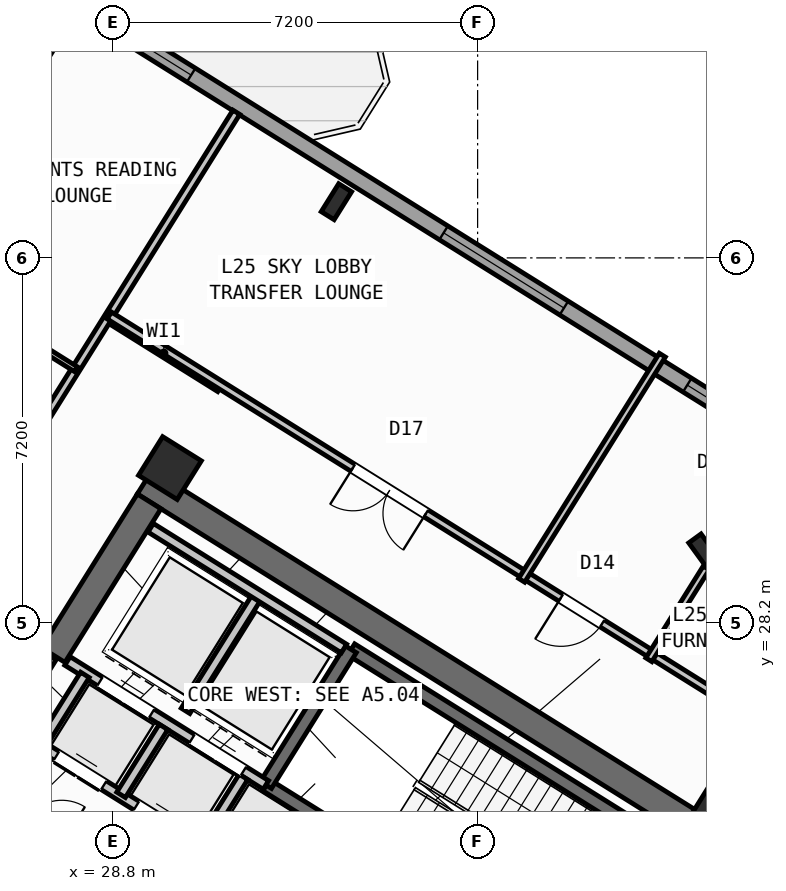
"""IFC4 building model, lengths in metres.
Left out: names, types, materials, properties, quantities, classifications, styles, units other than length and angle.
Written with IfcOpenShell. Run it as: python <this file> out.ifc"""

import sys

from ifc_helpers import new_model, si_unit, direction, frame, frame_2d, origin, origin_2d, place, context, subcontext, project, spatial, rectangle, hollow_rectangle, i_section, extrude, source, transform, mapped, element, fill, save


model = new_model("IFC4")
c1 = context("Model", 3, precision=1e-05, world=origin(), true_north=direction((0.0, 1.0)))
c2 = subcontext(c1, "Body", "Model", "MODEL_VIEW")
j1 = project(units=[si_unit("LENGTHUNIT", "METRE"), si_unit("PLANEANGLEUNIT", "RADIAN")], contexts=[c1])
p1 = place(None, origin())
s1 = spatial("IfcSite", under=j1, at=p1, CompositionType="ELEMENT")
p2 = place(p1, origin())
s2 = spatial("IfcBuilding", under=s1, at=p2, CompositionType="ELEMENT")
p3 = place(p2, frame((0.0, 0.0, 100.8)))
s3 = spatial("IfcBuildingStorey", under=s2, at=p3, CompositionType="ELEMENT", Elevation=100.8)
p4 = place(p3, frame((40.573, 24.01, 0.0), z_axis=(0.0, 0.0, 1.0), x_axis=(-0.848047359947, 0.529920442413, 0.0)))
e1 = element("IfcWall", 1, at=p4, inside=s3, PredefinedType="SHEAR", context=c2, shape_type="SweptSolid", body=[
    extrude(rectangle(XDim=13.14, YDim=0.55, at=frame_2d((6.57, 0.0))), origin(), (0.0, 0.0, 1.0), 4.25),
])
p5 = place(p3, frame((29.517, 30.594, 0.0), z_axis=(0.0, 0.0, 1.0), x_axis=(-0.529906864564, -0.848055844204, 0.0)))
e2 = element("IfcWall", 2, at=p5, inside=s3, PredefinedType="SHEAR", context=c2, shape_type="SweptSolid", body=[
    extrude(rectangle(XDim=3.575, YDim=0.55, at=frame_2d((1.788, 0.0))), origin(), (0.0, 0.0, 1.0), 4.25),
])
m1 = source(origin(), c2, "Body", "SweptSolid", [
    extrude(hollow_rectangle(XDim=0.9, YDim=0.9, WallThickness=0.036, at=origin_2d()), origin(), (0.0, 0.0, 1.0), 4.5),
])
p6 = place(p3, frame((40.783, 24.469, 0.0), z_axis=(0.0, 0.0, 1.0), x_axis=(-0.848048096156, 0.529919264233, 0.0)))
e3 = element("IfcColumn", 3, at=p6, inside=s3, PredefinedType="COLUMN", context=c2, shape_type="MappedRepresentation", body=[
    mapped(m1, transform((0.0, 0.0, 0.0), scale=1.0)),
])
m2 = source(origin(), c2, "Body", "SweptSolid", [
    extrude(i_section(OverallWidth=0.3, OverallDepth=0.65, WebThickness=0.016, FlangeThickness=0.031, at=origin_2d()), origin(), (0.0, 0.0, 1.0), 4.5),
])
p7 = place(p3, frame((33.213, 36.509, 0.0), z_axis=(0.0, 0.0, 1.0), x_axis=(-0.848048096156, 0.529919264233, 0.0)))
e4 = element("IfcColumn", 4, at=p7, inside=s3, PredefinedType="COLUMN", context=c2, shape_type="MappedRepresentation", body=[
    mapped(m2, transform((0.0, 0.0, 0.0), scale=1.0)),
])
p8 = place(p3, frame((29.928, 31.251, 0.0), z_axis=(0.0, 0.0, 1.0), x_axis=(-0.848048096156, 0.529919264233, 0.0)))
e5 = element("IfcColumn", 5, at=p8, inside=s3, PredefinedType="COLUMN", context=c2, shape_type="MappedRepresentation", body=[
    mapped(m1, transform((0.0, 0.0, 0.0), scale=1.0)),
])
p9 = place(p3, frame((40.479, 29.601, 0.0), z_axis=(0.0, 0.0, 1.0), x_axis=(0.809016994375, 0.587785252292, 0.0)))
e6 = element("IfcColumn", 6, at=p9, inside=s3, PredefinedType="COLUMN", context=c2, shape_type="MappedRepresentation", body=[
    mapped(m2, transform((0.0, 0.0, 0.0), scale=1.0)),
])
p10 = place(p3, frame((31.76, 12.183, 0.0), z_axis=(0.0, 0.0, 1.0), x_axis=(-0.848047074256, 0.529920899612, 0.0)))
e7 = element("IfcWall", 7, at=p10, inside=s3, PredefinedType="STANDARD", context=c2, shape_type="SweptSolid", body=[
    extrude(rectangle(XDim=30.652, YDim=0.32, at=frame_2d((15.326, 0.0))), origin(), (0.0, 0.0, 1.0), 4.25),
])
p11 = place(p10, frame((15.153, 0.0, 0.0)))
e8 = element("IfcOpeningElement", 8, at=p11, cuts=e7, PredefinedType="OPENING", context=c2, shape_type="SweptSolid", body=[
    extrude(rectangle(XDim=1.2, YDim=2.15, at=frame_2d((0.6, 1.075))), frame((0.0, 0.17, 0.0), z_axis=(0.0, -1.0, 0.0), x_axis=(1.0, 0.0, 0.0)), (0.0, 0.0, 1.0), 0.34),
])
p12 = place(p10, frame((1.652, 0.0, 0.65)))
e9 = element("IfcOpeningElement", 9, at=p12, cuts=e7, PredefinedType="OPENING", context=c2, shape_type="SweptSolid", body=[
    extrude(rectangle(XDim=2.8, YDim=2.1, at=frame_2d((1.4, 1.05))), frame((0.0, 0.17, 0.0), z_axis=(0.0, -1.0, 0.0), x_axis=(1.0, 0.0, 0.0)), (0.0, 0.0, 1.0), 0.34),
])
p13 = place(p10, frame((6.856, 0.0, 0.65)))
e10 = element("IfcOpeningElement", 10, at=p13, cuts=e7, PredefinedType="OPENING", context=c2, shape_type="SweptSolid", body=[
    extrude(rectangle(XDim=2.8, YDim=2.1, at=frame_2d((1.4, 1.05))), frame((0.0, 0.17, 0.0), z_axis=(0.0, -1.0, 0.0), x_axis=(1.0, 0.0, 0.0)), (0.0, 0.0, 1.0), 0.34),
])
p14 = place(p10, frame((20.478, 0.0, 0.85)))
e11 = element("IfcOpeningElement", 11, at=p14, cuts=e7, PredefinedType="OPENING", context=c2, shape_type="SweptSolid", body=[
    extrude(rectangle(XDim=1.5, YDim=1.5, at=frame_2d((0.75, 0.75))), frame((0.0, 0.17, 0.0), z_axis=(0.0, -1.0, 0.0), x_axis=(1.0, 0.0, 0.0)), (0.0, 0.0, 1.0), 0.34),
])
p15 = place(p10, frame((26.258, 0.0, 0.65)))
e12 = element("IfcOpeningElement", 12, at=p15, cuts=e7, PredefinedType="OPENING", context=c2, shape_type="SweptSolid", body=[
    extrude(rectangle(XDim=2.8, YDim=2.1, at=frame_2d((1.4, 1.05))), frame((0.0, 0.17, 0.0), z_axis=(0.0, -1.0, 0.0), x_axis=(1.0, 0.0, 0.0)), (0.0, 0.0, 1.0), 0.34),
])
p16 = place(p3, frame((17.424, 47.083, 0.0), z_axis=(0.0, 0.0, 1.0), x_axis=(0.848049927979, -0.529916332693, 0.0)))
e13 = element("IfcWall", 13, at=p16, inside=s3, PredefinedType="STANDARD", context=c2, shape_type="SweptSolid", body=[
    extrude(rectangle(XDim=29.223, YDim=0.32, at=frame_2d((14.612, 0.0))), origin(), (0.0, 0.0, 1.0), 4.25),
])
p17 = place(p16, frame((10.072, 0.0, 0.0)))
e14 = element("IfcOpeningElement", 14, at=p17, cuts=e13, PredefinedType="OPENING", context=c2, shape_type="SweptSolid", body=[
    extrude(rectangle(XDim=1.05, YDim=2.15, at=frame_2d((0.525, 1.075))), frame((0.0, 0.17, 0.0), z_axis=(0.0, -1.0, 0.0), x_axis=(1.0, 0.0, 0.0)), (0.0, 0.0, 1.0), 0.34),
])
p18 = place(p16, frame((0.869, 0.0, 0.85)))
e15 = element("IfcOpeningElement", 15, at=p18, cuts=e13, PredefinedType="OPENING", context=c2, shape_type="SweptSolid", body=[
    extrude(rectangle(XDim=1.5, YDim=1.5, at=frame_2d((0.75, 0.75))), frame((0.0, 0.17, 0.0), z_axis=(0.0, -1.0, 0.0), x_axis=(1.0, 0.0, 0.0)), (0.0, 0.0, 1.0), 0.34),
])
p19 = place(p16, frame((3.981, 0.0, 0.85)))
e16 = element("IfcOpeningElement", 16, at=p19, cuts=e13, PredefinedType="OPENING", context=c2, shape_type="SweptSolid", body=[
    extrude(rectangle(XDim=1.5, YDim=1.5, at=frame_2d((0.75, 0.75))), frame((0.0, 0.17, 0.0), z_axis=(0.0, -1.0, 0.0), x_axis=(1.0, 0.0, 0.0)), (0.0, 0.0, 1.0), 0.34),
])
p20 = place(p16, frame((13.739, 0.0, 0.85)))
e17 = element("IfcOpeningElement", 17, at=p20, cuts=e13, PredefinedType="OPENING", context=c2, shape_type="SweptSolid", body=[
    extrude(rectangle(XDim=1.5, YDim=1.5, at=frame_2d((0.75, 0.75))), frame((0.0, 0.17, 0.0), z_axis=(0.0, -1.0, 0.0), x_axis=(1.0, 0.0, 0.0)), (0.0, 0.0, 1.0), 0.34),
])
p21 = place(p16, frame((21.114, 0.0, 0.65)))
e18 = element("IfcOpeningElement", 18, at=p21, cuts=e13, PredefinedType="OPENING", context=c2, shape_type="SweptSolid", body=[
    extrude(rectangle(XDim=2.8, YDim=2.1, at=frame_2d((1.4, 1.05))), frame((0.0, 0.17, 0.0), z_axis=(0.0, -1.0, 0.0), x_axis=(1.0, 0.0, 0.0)), (0.0, 0.0, 1.0), 0.34),
])
p22 = place(p16, frame((26.784, 0.0, 0.85)))
e19 = element("IfcOpeningElement", 19, at=p22, cuts=e13, PredefinedType="OPENING", context=c2, shape_type="SweptSolid", body=[
    extrude(rectangle(XDim=1.5, YDim=1.5, at=frame_2d((0.75, 0.75))), frame((0.0, 0.17, 0.0), z_axis=(0.0, -1.0, 0.0), x_axis=(1.0, 0.0, 0.0)), (0.0, 0.0, 1.0), 0.34),
])
p23 = place(p3, frame((39.721, 23.788, 0.0), z_axis=(0.0, 0.0, 1.0), x_axis=(-0.848054434086, 0.529909121291, 0.0)))
e20 = element("IfcWall", 20, at=p23, inside=s3, PredefinedType="SHEAR", context=c2, shape_type="SweptSolid", body=[
    extrude(rectangle(XDim=7.33, YDim=0.26, at=frame_2d((3.665, 0.0))), origin(), (0.0, 0.0, 1.0), 4.25),
])
p24 = place(p3, frame((38.046, 21.108, 0.0), z_axis=(0.0, 0.0, 1.0), x_axis=(-0.848054434086, 0.529909121291, 0.0)))
e21 = element("IfcWall", 21, at=p24, inside=s3, PredefinedType="SHEAR", context=c2, shape_type="SweptSolid", body=[
    extrude(rectangle(XDim=7.33, YDim=0.26, at=frame_2d((3.665, 0.0))), origin(), (0.0, 0.0, 1.0), 4.25),
])
p25 = place(p24, frame((0.22, 0.0, 0.0)))
e22 = element("IfcOpeningElement", 22, at=p25, cuts=e21, PredefinedType="OPENING", context=c2, shape_type="SweptSolid", body=[
    extrude(rectangle(XDim=1.1, YDim=2.1, at=frame_2d((0.55, 1.05))), frame((0.0, 0.14, 0.0), z_axis=(0.0, -1.0, 0.0), x_axis=(1.0, 0.0, 0.0)), (0.0, 0.0, 1.0), 0.28),
])
p26 = place(p3, frame((33.496, 27.677, 0.0), z_axis=(0.0, 0.0, 1.0), x_axis=(-0.529908658664, -0.84805472316, 0.0)))
e23 = element("IfcWall", 23, at=p26, inside=s3, PredefinedType="SHEAR", context=c2, shape_type="SweptSolid", body=[
    extrude(rectangle(XDim=3.16, YDim=0.26, at=frame_2d((1.58, 0.0))), origin(), (0.0, 0.0, 1.0), 4.25),
])
p27 = place(p3, frame((31.822, 24.998, 0.0), z_axis=(0.0, 0.0, 1.0), x_axis=(-0.848036912365, 0.52993716162, 0.0)))
e24 = element("IfcWall", 24, at=p27, inside=s3, PredefinedType="STANDARD", context=c2, shape_type="SweptSolid", body=[
    extrude(rectangle(XDim=4.618, YDim=0.2, at=frame_2d((2.309, 0.0))), origin(), (0.0, 0.0, 1.0), 4.24),
])
p28 = place(p27, frame((0.52, 0.0, 0.0)))
e25 = element("IfcOpeningElement", 25, at=p28, cuts=e24, PredefinedType="OPENING", context=c2, shape_type="SweptSolid", body=[
    extrude(rectangle(XDim=1.2, YDim=2.15, at=frame_2d((0.6, 1.075))), frame((0.0, 0.11, 0.0), z_axis=(0.0, -1.0, 0.0), x_axis=(1.0, 0.0, 0.0)), (0.0, 0.0, 1.0), 0.22),
])
p29 = place(p27, frame((2.66, 0.0, 0.0)))
e26 = element("IfcOpeningElement", 26, at=p29, cuts=e24, PredefinedType="OPENING", context=c2, shape_type="SweptSolid", body=[
    extrude(rectangle(XDim=1.2, YDim=2.15, at=frame_2d((0.6, 1.075))), frame((0.0, 0.11, 0.0), z_axis=(0.0, -1.0, 0.0), x_axis=(1.0, 0.0, 0.0)), (0.0, 0.0, 1.0), 0.22),
])
p30 = place(p3, frame((32.108, 22.814, 0.0), z_axis=(0.0, 0.0, 1.0), x_axis=(-0.848042229521, 0.529928652696, 0.0)))
e27 = element("IfcWall", 27, at=p30, inside=s3, PredefinedType="STANDARD", context=c2, shape_type="SweptSolid", body=[
    extrude(rectangle(XDim=5.62, YDim=0.2, at=frame_2d((2.81, 0.0))), origin(), (0.0, 0.0, 1.0), 4.24),
])
p31 = place(p30, frame((0.39, 0.0, 0.0)))
e28 = element("IfcOpeningElement", 28, at=p31, cuts=e27, PredefinedType="OPENING", context=c2, shape_type="SweptSolid", body=[
    extrude(rectangle(XDim=1.1, YDim=2.15, at=frame_2d((0.55, 1.075))), frame((0.0, 0.11, 0.0), z_axis=(0.0, -1.0, 0.0), x_axis=(1.0, 0.0, 0.0)), (0.0, 0.0, 1.0), 0.22),
])
p32 = place(p30, frame((2.25, 0.0, 0.0)))
e29 = element("IfcOpeningElement", 29, at=p32, cuts=e27, PredefinedType="OPENING", context=c2, shape_type="SweptSolid", body=[
    extrude(rectangle(XDim=1.1, YDim=2.15, at=frame_2d((0.55, 1.075))), frame((0.0, 0.11, 0.0), z_axis=(0.0, -1.0, 0.0), x_axis=(1.0, 0.0, 0.0)), (0.0, 0.0, 1.0), 0.22),
])
p33 = place(p30, frame((4.11, 0.0, 0.0)))
e30 = element("IfcOpeningElement", 30, at=p33, cuts=e27, PredefinedType="OPENING", context=c2, shape_type="SweptSolid", body=[
    extrude(rectangle(XDim=1.1, YDim=2.15, at=frame_2d((0.55, 1.075))), frame((0.0, 0.11, 0.0), z_axis=(0.0, -1.0, 0.0), x_axis=(1.0, 0.0, 0.0)), (0.0, 0.0, 1.0), 0.22),
])
p34 = place(p3, frame((28.25, 27.17, 0.0), z_axis=(0.0, 0.0, 1.0), x_axis=(-0.529905827651, -0.848056492117, 0.0)))
e31 = element("IfcWall", 31, at=p34, inside=s3, PredefinedType="STANDARD", context=c2, shape_type="SweptSolid", body=[
    extrude(rectangle(XDim=1.65, YDim=0.2, at=frame_2d((0.825, 0.0))), origin(), (0.0, 0.0, 1.0), 4.24),
])
p35 = place(p3, frame((31.645, 28.716, 0.0), z_axis=(0.0, 0.0, 1.0), x_axis=(-0.52986693015, -0.848080795876, 0.0)))
e32 = element("IfcWall", 32, at=p35, inside=s3, PredefinedType="STANDARD", context=c2, shape_type="SweptSolid", body=[
    extrude(rectangle(XDim=2.66, YDim=0.2, at=frame_2d((1.33, 0.0))), origin(), (0.0, 0.0, 1.0), 4.24),
])
p36 = place(p3, frame((33.363, 27.69, 0.0), z_axis=(0.0, 0.0, 1.0), x_axis=(-0.848047090064, 0.529920874315, 0.0)))
e33 = element("IfcWall", 33, at=p36, inside=s3, PredefinedType="STANDARD", context=c2, shape_type="SweptSolid", body=[
    extrude(rectangle(XDim=4.498, YDim=0.2, at=frame_2d((2.249, 0.0))), origin(), (0.0, 0.0, 1.0), 4.24),
])
for number, where, z_axis, x_axis in (
    (34, (31.379, 25.156, 0.0), (0.0, 0.0, 1.0), (-0.53, -0.848, 0.0)),
    (35, (29.801, 26.142, 0.0), (0.0, 0.0, 1.0), (-0.53, -0.848, 0.0)),
):
    element("IfcWall", number, at=place(p3, frame(where, z_axis=z_axis, x_axis=x_axis)), inside=s3, PredefinedType="STANDARD", context=c2, shape_type="SweptSolid", body=[
        extrude(rectangle(XDim=1.58, YDim=0.2, at=frame_2d((0.79, 0.0))), origin(), (0.0, 0.0, 1.0), 4.24),
    ])
p37 = place(p3, frame((31.525, 21.504, 0.0), z_axis=(0.0, 0.0, 1.0), x_axis=(-0.848040211232, 0.529931882541, 0.0)))
e36 = element("IfcWall", 36, at=p37, inside=s3, PredefinedType="STANDARD", context=c2, shape_type="SweptSolid", body=[
    extrude(rectangle(XDim=6.218, YDim=0.2, at=frame_2d((3.109, 0.0))), origin(), (0.0, 0.0, 1.0), 4.24),
])
p38 = place(p37, frame((4.4, 0.0, 0.0)))
e37 = element("IfcOpeningElement", 37, at=p38, cuts=e36, PredefinedType="OPENING", context=c2, shape_type="SweptSolid", body=[
    extrude(rectangle(XDim=0.86, YDim=2.05, at=frame_2d((0.43, 1.025))), frame((0.0, 0.11, 0.0), z_axis=(0.0, -1.0, 0.0), x_axis=(1.0, 0.0, 0.0)), (0.0, 0.0, 1.0), 0.22),
])
p39 = place(p37, frame((1.45, 0.0, 0.0)))
e38 = element("IfcOpeningElement", 38, at=p39, cuts=e36, PredefinedType="OPENING", context=c2, shape_type="SweptSolid", body=[
    extrude(rectangle(XDim=0.86, YDim=2.05, at=frame_2d((0.43, 1.025))), frame((0.0, 0.11, 0.0), z_axis=(0.0, -1.0, 0.0), x_axis=(1.0, 0.0, 0.0)), (0.0, 0.0, 1.0), 0.22),
])
p40 = place(p3, frame((27.596, 27.52, 0.0), z_axis=(0.0, 0.0, 1.0), x_axis=(-0.529865479138, -0.848081702443, 0.0)))
e39 = element("IfcWall", 39, at=p40, inside=s3, PredefinedType="STANDARD", context=c2, shape_type="SweptSolid", body=[
    extrude(rectangle(XDim=2.96, YDim=0.2, at=frame_2d((1.48, 0.0))), origin(), (0.0, 0.0, 1.0), 4.24),
])
p41 = place(p40, frame((1.76, 0.0, 0.0)))
e40 = element("IfcOpeningElement", 40, at=p41, cuts=e39, PredefinedType="OPENING", context=c2, shape_type="SweptSolid", body=[
    extrude(rectangle(XDim=0.86, YDim=2.05, at=frame_2d((0.43, 1.025))), frame((0.0, 0.11, 0.0), z_axis=(0.0, -1.0, 0.0), x_axis=(1.0, 0.0, 0.0)), (0.0, 0.0, 1.0), 0.22),
])
p42 = place(p3, frame((30.914, 32.829, 0.0), z_axis=(0.0, 0.0, 1.0), x_axis=(-0.848008813643, 0.529982124211, 0.0)))
e41 = element("IfcWall", 41, at=p42, inside=s3, PredefinedType="PARTITIONING", context=c2, shape_type="SweptSolid", body=[
    extrude(rectangle(XDim=2.61, YDim=0.16, at=frame_2d((1.305, 0.0))), origin(), (0.0, 0.0, 1.0), 4.24),
])
p43 = place(p3, frame((31.239, 38.274, 0.0), z_axis=(0.0, 0.0, 1.0), x_axis=(-0.529918877109, -0.848048338059, 0.0)))
e42 = element("IfcWall", 42, at=p43, inside=s3, PredefinedType="PARTITIONING", context=c2, shape_type="SweptSolid", body=[
    extrude(rectangle(XDim=15.35, YDim=0.16, at=frame_2d((7.675, 0.0))), origin(), (0.0, 0.0, 1.0), 4.24),
])
p44 = place(p3, frame((27.607, 39.615, 0.0), z_axis=(0.0, 0.0, 1.0), x_axis=(-0.529913610495, -0.848051628978, 0.0)))
e43 = element("IfcWall", 43, at=p44, inside=s3, PredefinedType="PARTITIONING", context=c2, shape_type="SweptSolid", body=[
    extrude(rectangle(XDim=5.401, YDim=0.16, at=frame_2d((2.7, 0.0))), origin(), (0.0, 0.0, 1.0), 3.675),
])
p45 = place(p3, frame((28.071, 33.204, 0.0), z_axis=(0.0, 0.0, 1.0), x_axis=(-0.848059820872, 0.529900500304, 0.0)))
e44 = element("IfcWall", 44, at=p45, inside=s3, PredefinedType="PARTITIONING", context=c2, shape_type="SweptSolid", body=[
    extrude(rectangle(XDim=3.79, YDim=0.11, at=frame_2d((1.895, 0.0))), origin(), (0.0, 0.0, 1.0), 4.24),
])
p46 = place(p45, frame((1.435, 0.0, 0.0)))
e45 = element("IfcOpeningElement", 45, at=p46, cuts=e44, PredefinedType="OPENING", context=c2, shape_type="SweptSolid", body=[
    extrude(rectangle(XDim=0.92, YDim=2.08, at=frame_2d((0.46, 1.04))), frame((0.0, 0.065, 0.0), z_axis=(0.0, -1.0, 0.0), x_axis=(1.0, 0.0, 0.0)), (0.0, 0.0, 1.0), 0.13),
])
p47 = place(p3, frame((41.936, 26.012, 0.0), z_axis=(0.0, 0.0, 1.0), x_axis=(-0.848051154596, 0.529914369676, 0.0)))
e46 = element("IfcWall", 46, at=p47, inside=s3, PredefinedType="PARTITIONING", context=c2, shape_type="SweptSolid", body=[
    extrude(rectangle(XDim=15.57, YDim=0.16, at=frame_2d((7.785, 0.0))), origin(), (0.0, 0.0, 1.0), 4.24),
])
p48 = place(p47, frame((4.1, 0.0, 0.0)))
e47 = element("IfcOpeningElement", 47, at=p48, cuts=e46, PredefinedType="OPENING", context=c2, shape_type="SweptSolid", body=[
    extrude(rectangle(XDim=0.96, YDim=2.08, at=frame_2d((0.48, 1.04))), frame((0.0, 0.09, 0.0), z_axis=(0.0, -1.0, 0.0), x_axis=(1.0, 0.0, 0.0)), (0.0, 0.0, 1.0), 0.18),
])
p49 = place(p47, frame((8.2, 0.0, 0.0)))
e48 = element("IfcOpeningElement", 48, at=p49, cuts=e46, PredefinedType="OPENING", context=c2, shape_type="SweptSolid", body=[
    extrude(rectangle(XDim=1.7, YDim=2.2, at=frame_2d((0.85, 1.1))), frame((0.0, 0.09, 0.0), z_axis=(0.0, -1.0, 0.0), x_axis=(1.0, 0.0, 0.0)), (0.0, 0.0, 1.0), 0.18),
])
p50 = place(p3, frame((40.512, 29.281, 0.0), z_axis=(0.0, 0.0, 1.0), x_axis=(-0.529947607416, -0.848030384712, 0.0)))
e49 = element("IfcWall", 49, at=p50, inside=s3, PredefinedType="PLUMBINGWALL", context=c2, shape_type="SweptSolid", body=[
    extrude(rectangle(XDim=2.138, YDim=0.14, at=frame_2d((1.069, 0.0))), origin(), (0.0, 0.0, 1.0), 4.24),
])
p51 = place(p3, frame((39.646, 33.48, 0.0), z_axis=(0.0, 0.0, 1.0), x_axis=(-0.529923555071, -0.848045414928, 0.0)))
e50 = element("IfcWall", 50, at=p51, inside=s3, PredefinedType="PLUMBINGWALL", context=c2, shape_type="SweptSolid", body=[
    extrude(rectangle(XDim=5.24, YDim=0.14, at=frame_2d((2.62, 0.0))), origin(), (0.0, 0.0, 1.0), 4.24),
])
m3 = source(origin(), c2, "Body", "SweptSolid", [
    extrude(rectangle(XDim=1.5, YDim=1.5, at=frame_2d((0.75, 0.75))), frame((0.0, 0.03, 0.0), z_axis=(0.0, -1.0, 0.0), x_axis=(1.0, 0.0, 0.0)), (0.0, 0.0, 1.0), 0.06),
])
p52 = place(p20, origin())
e51 = element("IfcWindow", 51, at=p52, inside=s3, PartitioningType="SINGLE_PANEL", PredefinedType="WINDOW", context=c2, shape_type="MappedRepresentation", body=[
    mapped(m3, transform((0.0, 0.0, 0.0), scale=1.0)),
])
fill(e17, e51)
m4 = source(origin(), c2, "Body", "SweptSolid", [
    extrude(rectangle(XDim=2.8, YDim=2.1, at=frame_2d((1.4, 1.05))), frame((0.0, 0.03, 0.0), z_axis=(0.0, -1.0, 0.0), x_axis=(1.0, 0.0, 0.0)), (0.0, 0.0, 1.0), 0.06),
])
p53 = place(p21, origin())
e52 = element("IfcWindow", 52, at=p53, inside=s3, PartitioningType="SINGLE_PANEL", PredefinedType="WINDOW", context=c2, shape_type="MappedRepresentation", body=[
    mapped(m4, transform((0.0, 0.0, 0.0), scale=1.0)),
])
fill(e18, e52)
p54 = place(p22, origin())
e53 = element("IfcWindow", 53, at=p54, inside=s3, PartitioningType="SINGLE_PANEL", PredefinedType="WINDOW", context=c2, shape_type="MappedRepresentation", body=[
    mapped(m3, transform((0.0, 0.0, 0.0), scale=1.0)),
])
fill(e19, e53)
m5 = source(origin(), c2, "Body", "SweptSolid", [
    extrude(rectangle(XDim=1.2, YDim=2.15, at=frame_2d((0.6, 1.075))), frame((0.0, 0.025, 0.0), z_axis=(0.0, -1.0, 0.0), x_axis=(1.0, 0.0, 0.0)), (0.0, 0.0, 1.0), 0.05),
])
p55 = place(p28, origin())
e54 = element("IfcDoor", 54, at=p55, inside=s3, OperationType="DOUBLE_DOOR_SLIDING", PredefinedType="DOOR", context=c2, shape_type="MappedRepresentation", body=[
    mapped(m5, transform((0.0, 0.0, 0.0), scale=1.0)),
])
fill(e25, e54)
p56 = place(p29, origin())
e55 = element("IfcDoor", 55, at=p56, inside=s3, OperationType="DOUBLE_DOOR_SLIDING", PredefinedType="DOOR", context=c2, shape_type="MappedRepresentation", body=[
    mapped(m5, transform((0.0, 0.0, 0.0), scale=1.0)),
])
fill(e26, e55)
m6 = source(origin(), c2, "Body", "SweptSolid", [
    extrude(rectangle(XDim=1.1, YDim=2.15, at=frame_2d((0.55, 1.075))), frame((0.0, 0.025, 0.0), z_axis=(0.0, -1.0, 0.0), x_axis=(1.0, 0.0, 0.0)), (0.0, 0.0, 1.0), 0.05),
])
p57 = place(p32, origin())
e56 = element("IfcDoor", 56, at=p57, inside=s3, OperationType="DOUBLE_DOOR_SLIDING", PredefinedType="DOOR", context=c2, shape_type="MappedRepresentation", body=[
    mapped(m6, transform((0.0, 0.0, 0.0), scale=1.0)),
])
fill(e29, e56)
p58 = place(p33, origin())
e57 = element("IfcDoor", 57, at=p58, inside=s3, OperationType="DOUBLE_DOOR_SLIDING", PredefinedType="DOOR", context=c2, shape_type="MappedRepresentation", body=[
    mapped(m6, transform((0.0, 0.0, 0.0), scale=1.0)),
])
fill(e30, e57)
m7 = source(origin(), c2, "Body", "SweptSolid", [
    extrude(rectangle(XDim=0.96, YDim=2.08, at=frame_2d((0.48, 1.04))), frame((0.0, 0.025, 0.0), z_axis=(0.0, -1.0, 0.0), x_axis=(1.0, 0.0, 0.0)), (0.0, 0.0, 1.0), 0.05),
])
p59 = place(p48, origin())
e58 = element("IfcDoor", 58, at=p59, inside=s3, OperationType="SINGLE_SWING_RIGHT", PredefinedType="DOOR", context=c2, shape_type="MappedRepresentation", body=[
    mapped(m7, transform((0.0, 0.0, 0.0), scale=1.0)),
])
fill(e47, e58)
m8 = source(origin(), c2, "Body", "SweptSolid", [
    extrude(rectangle(XDim=1.7, YDim=2.2, at=frame_2d((0.85, 1.1))), frame((0.0, 0.025, 0.0), z_axis=(0.0, -1.0, 0.0), x_axis=(1.0, 0.0, 0.0)), (0.0, 0.0, 1.0), 0.05),
])
p60 = place(p49, origin())
e59 = element("IfcDoor", 59, at=p60, inside=s3, OperationType="DOUBLE_DOOR_SINGLE_SWING", PredefinedType="DOOR", context=c2, shape_type="MappedRepresentation", body=[
    mapped(m8, transform((0.0, 0.0, 0.0), scale=1.0)),
])
fill(e48, e59)
save(model, sys.argv[1])
